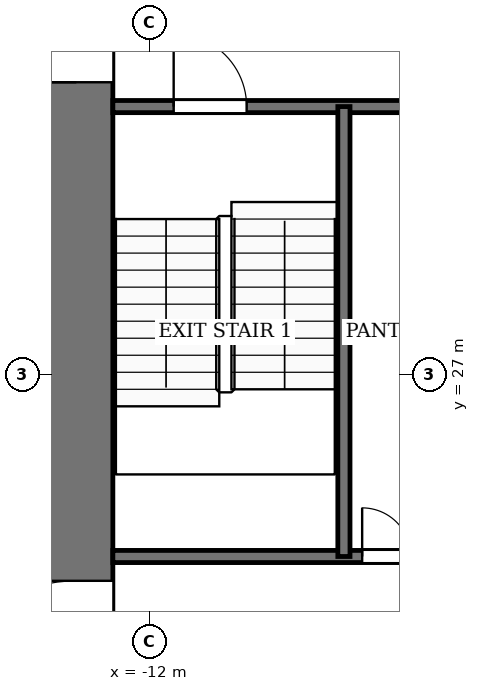
"""IFC4 building model, lengths in metres.
Left out: names, types, materials, properties, quantities, classifications, styles, units other than length and angle.
Written with IfcOpenShell. Run it as: python <this file> out.ifc"""

import sys

from ifc_helpers import new_model, si_unit, direction, frame, frame_2d, origin, place, context, subcontext, project, spatial, rectangle, extrude, element, fill, save


model = new_model("IFC4")
c1 = context("Model", 3, precision=1e-05, world=origin(), true_north=direction((0.0, 1.0)))
c2 = subcontext(c1, "Body", "Model", "MODEL_VIEW")
j1 = project(units=[si_unit("LENGTHUNIT", "METRE"), si_unit("PLANEANGLEUNIT", "RADIAN")], contexts=[c1])
p1 = place(None, origin())
s1 = spatial("IfcSite", under=j1, at=p1, CompositionType="ELEMENT")
p2 = place(p1, origin())
s2 = spatial("IfcBuilding", under=s1, at=p2, CompositionType="ELEMENT")
p3 = place(p2, frame((0.0, 0.0, 94.0)))
s3 = spatial("IfcBuildingStorey", under=s2, at=p3, CompositionType="ELEMENT", Elevation=94.0)
p4 = place(p3, frame((-13.2, 18.4, -0.13), z_axis=(0.0, 0.0, 1.0), x_axis=(0.0, 1.0, 0.0)))
e1 = element("IfcWall", 1, at=p4, inside=s3, PredefinedType="SHEAR", context=c2, shape_type="SweptSolid", body=[
    extrude(rectangle(XDim=19.2, YDim=1.2, at=frame_2d((9.6, 0.0))), origin(), (0.0, 0.0, 1.0), 4.0),
])
p5 = place(p4, frame((2.8, 0.0, 0.13)))
e2 = element("IfcOpeningElement", 2, at=p5, cuts=e1, PredefinedType="OPENING", context=c2, shape_type="SweptSolid", body=[
    extrude(rectangle(XDim=2.4, YDim=2.4, at=frame_2d((1.2, 1.2))), frame((0.0, 0.61, 0.0), z_axis=(0.0, -1.0, 0.0), x_axis=(1.0, 0.0, 0.0)), (0.0, 0.0, 1.0), 1.22),
])
p6 = place(p4, frame((13.4, 0.0, 0.13)))
e3 = element("IfcOpeningElement", 3, at=p6, cuts=e1, PredefinedType="OPENING", context=c2, shape_type="SweptSolid", body=[
    extrude(rectangle(XDim=1.4, YDim=2.2, at=frame_2d((0.7, 1.1))), frame((0.0, 0.61, 0.0), z_axis=(0.0, -1.0, 0.0), x_axis=(1.0, 0.0, 0.0)), (0.0, 0.0, 1.0), 1.22),
])
p7 = place(p3, frame((-12.6, 24.0, 0.0), z_axis=(0.0, 0.0, 1.0), x_axis=(1.0, 0.0, 0.0)))
e4 = element("IfcWall", 4, at=p7, inside=s3, PredefinedType="PARTITIONING", context=c2, shape_type="SweptSolid", body=[
    extrude(rectangle(XDim=6.6, YDim=0.2, at=frame_2d((3.3, 0.0))), origin(), (0.0, 0.0, 1.0), 3.87),
])
p8 = place(p7, frame((4.1, 0.0, 0.0)))
e5 = element("IfcOpeningElement", 5, at=p8, cuts=e4, PredefinedType="OPENING", context=c2, shape_type="SweptSolid", body=[
    extrude(rectangle(XDim=0.8, YDim=2.1, at=frame_2d((0.4, 1.05))), frame((0.0, 0.11, 0.0), z_axis=(0.0, -1.0, 0.0), x_axis=(1.0, 0.0, 0.0)), (0.0, 0.0, 1.0), 0.22),
])
p9 = place(p7, frame((5.5, 0.0, 0.0)))
e6 = element("IfcOpeningElement", 6, at=p9, cuts=e4, PredefinedType="OPENING", context=c2, shape_type="SweptSolid", body=[
    extrude(rectangle(XDim=0.8, YDim=2.1, at=frame_2d((0.4, 1.05))), frame((0.0, 0.11, 0.0), z_axis=(0.0, -1.0, 0.0), x_axis=(1.0, 0.0, 0.0)), (0.0, 0.0, 1.0), 0.22),
])
p10 = place(p3, frame((-12.6, 31.4, 0.0), z_axis=(0.0, 0.0, 1.0), x_axis=(1.0, 0.0, 0.0)))
e7 = element("IfcWall", 7, at=p10, inside=s3, PredefinedType="PARTITIONING", context=c2, shape_type="SweptSolid", body=[
    extrude(rectangle(XDim=6.6, YDim=0.2, at=frame_2d((3.3, 0.0))), origin(), (0.0, 0.0, 1.0), 3.87),
])
p11 = place(p10, frame((1.0, 0.0, 0.0)))
e8 = element("IfcOpeningElement", 8, at=p11, cuts=e7, PredefinedType="OPENING", context=c2, shape_type="SweptSolid", body=[
    extrude(rectangle(XDim=1.2, YDim=2.2, at=frame_2d((0.6, 1.1))), frame((0.0, 0.11, 0.0), z_axis=(0.0, -1.0, 0.0), x_axis=(1.0, 0.0, 0.0)), (0.0, 0.0, 1.0), 0.22),
])
p12 = place(p3, frame((-8.8, 24.0, 0.0), z_axis=(0.0, 0.0, 1.0), x_axis=(0.0, 1.0, 0.0)))
e9 = element("IfcWall", 9, at=p12, inside=s3, PredefinedType="PARTITIONING", context=c2, shape_type="SweptSolid", body=[
    extrude(rectangle(XDim=7.4, YDim=0.2, at=frame_2d((3.7, 0.0))), origin(), (0.0, 0.0, 1.0), 3.87),
])
p13 = place(p8, origin())
e10 = element("IfcDoor", 10, at=p13, inside=s3, OperationType="SINGLE_SWING_LEFT", PredefinedType="DOOR", context=c2, shape_type="SweptSolid", body=[
    extrude(rectangle(XDim=0.8, YDim=2.1, at=frame_2d((0.4, 1.05))), frame((0.0, 0.025, 0.0), z_axis=(0.0, -1.0, 0.0), x_axis=(1.0, 0.0, 0.0)), (0.0, 0.0, 1.0), 0.05),
])
fill(e5, e10)
p14 = place(p11, origin())
e11 = element("IfcDoor", 11, at=p14, inside=s3, OperationType="SINGLE_SWING_RIGHT", PredefinedType="DOOR", context=c2, shape_type="SweptSolid", body=[
    extrude(rectangle(XDim=1.2, YDim=2.2, at=frame_2d((0.6, 1.1))), frame((0.0, 0.025, 0.0), z_axis=(0.0, -1.0, 0.0), x_axis=(1.0, 0.0, 0.0)), (0.0, 0.0, 1.0), 0.05),
])
fill(e8, e11)
p15 = place(p5, origin())
e12 = element("IfcDoor", 12, at=p15, inside=s3, OperationType="DOUBLE_DOOR_SINGLE_SWING", PredefinedType="DOOR", context=c2, shape_type="SweptSolid", body=[
    extrude(rectangle(XDim=2.4, YDim=2.4, at=frame_2d((1.2, 1.2))), frame((0.0, 0.025, 0.0), z_axis=(0.0, -1.0, 0.0), x_axis=(1.0, 0.0, 0.0)), (0.0, 0.0, 1.0), 0.05),
])
fill(e2, e12)
p16 = place(p6, origin())
e13 = element("IfcDoor", 13, at=p16, inside=s3, OperationType="SINGLE_SWING_RIGHT", PredefinedType="DOOR", context=c2, shape_type="SweptSolid", body=[
    extrude(rectangle(XDim=1.4, YDim=2.2, at=frame_2d((0.7, 1.1))), frame((0.0, 0.025, 0.0), z_axis=(0.0, -1.0, 0.0), x_axis=(1.0, 0.0, 0.0)), (0.0, 0.0, 1.0), 0.05),
])
fill(e3, e13)
save(model, sys.argv[1])
